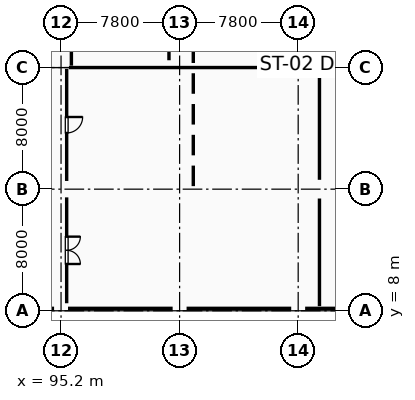
"""IFC4 building model, lengths in metres.
Left out: names, types, materials, properties, quantities, classifications, styles, units other than length and angle.
Written with IfcOpenShell. Run it as: python <this file> out.ifc"""

import sys

from ifc_helpers import new_model, si_unit, direction, frame, frame_2d, origin, origin_2d, place, context, subcontext, project, spatial, rectangle, extrude, element, fill, save


model = new_model("IFC4")
c1 = context("Model", 3, precision=1e-05, world=origin(), true_north=direction((0.0, 1.0)))
c2 = subcontext(c1, "Body", "Model", "MODEL_VIEW")
j1 = project(units=[si_unit("LENGTHUNIT", "METRE"), si_unit("PLANEANGLEUNIT", "RADIAN")], contexts=[c1])
p1 = place(None, origin())
s1 = spatial("IfcSite", under=j1, at=p1, CompositionType="ELEMENT")
p2 = place(p1, origin())
s2 = spatial("IfcBuilding", under=s1, at=p2, CompositionType="ELEMENT")
p3 = place(p2, origin())
s3 = spatial("IfcBuildingStorey", under=s2, at=p3, CompositionType="ELEMENT", Elevation=0.0)
for number, where, z_axis, x_axis in (
    (1, (95.2, 8.0, 0.0), (0.0, 0.0, 1.0), (1.0, 0.0, 0.0)),
    (2, (103.0, 8.0, 0.0), (0.0, 0.0, 1.0), (1.0, 0.0, 0.0)),
    (3, (110.8, 8.0, 0.0), (0.0, 0.0, 1.0), (1.0, 0.0, 0.0)),
):
    element("IfcColumn", number, at=place(p3, frame(where, z_axis=z_axis, x_axis=x_axis)), inside=s3, PredefinedType="COLUMN", context=c2, shape_type="SweptSolid", body=[
        extrude(rectangle(XDim=0.9, YDim=0.9, at=origin_2d()), origin(), (0.0, 0.0, 1.0), 5.4),
    ])
for number, where, z_axis, x_axis in (
    (4, (95.2, 16.0, 0.0), (0.0, 0.0, 1.0), (1.0, 0.0, 0.0)),
    (5, (103.0, 16.0, 0.0), (0.0, 0.0, 1.0), (1.0, 0.0, 0.0)),
):
    element("IfcColumn", number, at=place(p3, frame(where, z_axis=z_axis, x_axis=x_axis)), inside=s3, PredefinedType="COLUMN", context=c2, shape_type="SweptSolid", body=[
        extrude(rectangle(XDim=1.05, YDim=1.05, at=origin_2d()), origin(), (0.0, 0.0, 1.0), 5.4),
    ])
p4 = place(p3, frame((112.6, 16.0, 0.0), z_axis=(0.0, 0.0, 1.0), x_axis=(1.0, 0.0, 0.0)))
e6 = element("IfcColumn", 6, at=p4, inside=s3, PredefinedType="COLUMN", context=c2, shape_type="SweptSolid", body=[
    extrude(rectangle(XDim=1.2, YDim=1.2, at=origin_2d()), origin(), (0.0, 0.0, 1.0), 5.4),
])
p5 = place(p3, frame((118.45, 8.16, 0.0), z_axis=(0.0, 0.0, 1.0), x_axis=(-1.0, 0.0, 0.0)))
e7 = element("IfcWall", 7, at=p5, inside=s3, PredefinedType="STANDARD", context=c2, shape_type="SweptSolid", body=[
    extrude(rectangle(XDim=7.192, YDim=0.28, at=frame_2d((3.596, 0.0))), origin(), (0.0, 0.0, 1.0), 5.4),
])
p6 = place(p5, frame((2.896, 0.0, 0.95)))
e8 = element("IfcOpeningElement", 8, at=p6, cuts=e7, PredefinedType="OPENING", context=c2, shape_type="SweptSolid", body=[
    extrude(rectangle(XDim=1.4, YDim=1.8, at=frame_2d((0.7, 0.9))), frame((0.0, 0.15, 0.0), z_axis=(0.0, -1.0, 0.0), x_axis=(1.0, 0.0, 0.0)), (0.0, 0.0, 1.0), 0.3),
])
p7 = place(p3, frame((110.342, 8.16, 0.0), z_axis=(0.0, 0.0, 1.0), x_axis=(-1.0, 0.0, 0.0)))
e9 = element("IfcWall", 9, at=p7, inside=s3, PredefinedType="STANDARD", context=c2, shape_type="SweptSolid", body=[
    extrude(rectangle(XDim=6.884, YDim=0.28, at=frame_2d((3.442, 0.0))), origin(), (0.0, 0.0, 1.0), 4.705),
])
p8 = place(p7, frame((2.742, 0.0, 0.95)))
e10 = element("IfcOpeningElement", 10, at=p8, cuts=e9, PredefinedType="OPENING", context=c2, shape_type="SweptSolid", body=[
    extrude(rectangle(XDim=1.4, YDim=2.1, at=frame_2d((0.7, 1.05))), frame((0.0, 0.15, 0.0), z_axis=(0.0, -1.0, 0.0), x_axis=(1.0, 0.0, 0.0)), (0.0, 0.0, 1.0), 0.3),
])
p9 = place(p3, frame((102.542, 8.16, 0.0), z_axis=(0.0, 0.0, 1.0), x_axis=(-1.0, 0.0, 0.0)))
e11 = element("IfcWall", 11, at=p9, inside=s3, PredefinedType="STANDARD", context=c2, shape_type="SweptSolid", body=[
    extrude(rectangle(XDim=6.884, YDim=0.28, at=frame_2d((3.442, 0.0))), origin(), (0.0, 0.0, 1.0), 4.655),
])
p10 = place(p9, frame((2.642, 0.0, 0.95)))
e12 = element("IfcOpeningElement", 12, at=p10, cuts=e11, PredefinedType="OPENING", context=c2, shape_type="SweptSolid", body=[
    extrude(rectangle(XDim=1.6, YDim=1.2, at=frame_2d((0.8, 0.6))), frame((0.0, 0.15, 0.0), z_axis=(0.0, -1.0, 0.0), x_axis=(1.0, 0.0, 0.0)), (0.0, 0.0, 1.0), 0.3),
])
p11 = place(p3, frame((94.742, 8.16, 0.0), z_axis=(0.0, 0.0, 1.0), x_axis=(-1.0, 0.0, 0.0)))
e13 = element("IfcWall", 13, at=p11, inside=s3, PredefinedType="STANDARD", context=c2, shape_type="SweptSolid", body=[
    extrude(rectangle(XDim=6.884, YDim=0.28, at=frame_2d((3.442, 0.0))), origin(), (0.0, 0.0, 1.0), 4.605),
])
p12 = place(p11, frame((2.642, 0.0, 0.95)))
e14 = element("IfcOpeningElement", 14, at=p12, cuts=e13, PredefinedType="OPENING", context=c2, shape_type="SweptSolid", body=[
    extrude(rectangle(XDim=1.6, YDim=1.5, at=frame_2d((0.8, 0.75))), frame((0.0, 0.15, 0.0), z_axis=(0.0, -1.0, 0.0), x_axis=(1.0, 0.0, 0.0)), (0.0, 0.0, 1.0), 0.3),
])
p13 = place(p3, frame((95.88, 37.905, 0.0), z_axis=(0.0, 0.0, 1.0), x_axis=(0.0, -1.0, 0.0)))
e15 = element("IfcWall", 15, at=p13, inside=s3, PredefinedType="PARTITIONING", context=c2, shape_type="SweptSolid", body=[
    extrude(rectangle(XDim=13.78, YDim=0.15, at=frame_2d((6.89, 0.0))), origin(), (0.0, 0.0, 1.0), 5.4),
])
p14 = place(p13, frame((6.45, 0.0, 0.0)))
e16 = element("IfcOpeningElement", 16, at=p14, cuts=e15, PredefinedType="OPENING", context=c2, shape_type="SweptSolid", body=[
    extrude(rectangle(XDim=0.88, YDim=2.1, at=frame_2d((0.44, 1.05))), frame((0.0, 0.085, 0.0), z_axis=(0.0, -1.0, 0.0), x_axis=(1.0, 0.0, 0.0)), (0.0, 0.0, 1.0), 0.17),
])
p15 = place(p3, frame((95.57, 23.905, 0.0), z_axis=(0.0, 0.0, 1.0), x_axis=(0.0, -1.0, 0.0)))
e17 = element("IfcWall", 17, at=p15, inside=s3, PredefinedType="PARTITIONING", context=c2, shape_type="SweptSolid", body=[
    extrude(rectangle(XDim=7.365, YDim=0.15, at=frame_2d((3.683, 0.0))), origin(), (0.0, 0.0, 1.0), 4.3),
])
p16 = place(p15, frame((3.158, 0.0, 0.0)))
e18 = element("IfcOpeningElement", 18, at=p16, cuts=e17, PredefinedType="OPENING", context=c2, shape_type="SweptSolid", body=[
    extrude(rectangle(XDim=1.05, YDim=2.15, at=frame_2d((0.525, 1.075))), frame((0.0, 0.085, 0.0), z_axis=(0.0, -1.0, 0.0), x_axis=(1.0, 0.0, 0.0)), (0.0, 0.0, 1.0), 0.17),
])
p17 = place(p3, frame((95.57, 15.46, 0.0), z_axis=(0.0, 0.0, 1.0), x_axis=(0.0, -1.0, 0.0)))
e19 = element("IfcWall", 19, at=p17, inside=s3, PredefinedType="PARTITIONING", context=c2, shape_type="SweptSolid", body=[
    extrude(rectangle(XDim=6.965, YDim=0.15, at=frame_2d((3.482, 0.0))), origin(), (0.0, 0.0, 1.0), 4.3),
])
p18 = place(p17, frame((2.583, 0.0, 0.0)))
e20 = element("IfcOpeningElement", 20, at=p18, cuts=e19, PredefinedType="OPENING", context=c2, shape_type="SweptSolid", body=[
    extrude(rectangle(XDim=1.8, YDim=2.15, at=frame_2d((0.9, 1.075))), frame((0.0, 0.085, 0.0), z_axis=(0.0, -1.0, 0.0), x_axis=(1.0, 0.0, 0.0)), (0.0, 0.0, 1.0), 0.17),
])
p19 = place(p3, frame((95.72, 24.0, 0.0), z_axis=(0.0, 0.0, 1.0), x_axis=(1.0, 0.0, 0.0)))
e21 = element("IfcWall", 21, at=p19, inside=s3, PredefinedType="PARTITIONING", context=c2, shape_type="SweptSolid", body=[
    extrude(rectangle(XDim=16.36, YDim=0.2, at=frame_2d((8.18, 0.0))), origin(), (0.0, 0.0, 1.0), 4.3),
])
p20 = place(p3, frame((112.2, 23.88, 0.0), z_axis=(0.0, 0.0, 1.0), x_axis=(0.0, -1.0, 0.0)))
e22 = element("IfcWall", 22, at=p20, inside=s3, PredefinedType="PARTITIONING", context=c2, shape_type="SweptSolid", body=[
    extrude(rectangle(XDim=7.265, YDim=0.2, at=frame_2d((3.632, 0.0))), origin(), (0.0, 0.0, 1.0), 4.3),
])
p21 = place(p3, frame((112.2, 15.385, 0.0), z_axis=(0.0, 0.0, 1.0), x_axis=(0.0, -1.0, 0.0)))
e23 = element("IfcWall", 23, at=p21, inside=s3, PredefinedType="PARTITIONING", context=c2, shape_type="SweptSolid", body=[
    extrude(rectangle(XDim=7.081, YDim=0.2, at=frame_2d((3.541, 0.0))), origin(), (0.0, 0.0, 1.0), 4.3),
])
p22 = place(p3, frame((102.3, 31.92, 0.0), z_axis=(0.0, 0.0, 1.0), x_axis=(0.0, -1.0, 0.0)))
e24 = element("IfcWall", 24, at=p22, inside=s3, PredefinedType="PARTITIONING", context=c2, shape_type="SweptSolid", body=[
    extrude(rectangle(XDim=7.44, YDim=0.12, at=frame_2d((3.72, 0.0))), origin(), (0.0, 0.0, 1.0), 5.4),
])
p23 = place(p8, origin())
e25 = element("IfcWindow", 25, at=p23, inside=s3, PartitioningType="SINGLE_PANEL", PredefinedType="WINDOW", context=c2, shape_type="SweptSolid", body=[
    extrude(rectangle(XDim=1.4, YDim=2.1, at=frame_2d((0.7, 1.05))), frame((0.0, 0.03, 0.0), z_axis=(0.0, -1.0, 0.0), x_axis=(1.0, 0.0, 0.0)), (0.0, 0.0, 1.0), 0.06),
])
fill(e10, e25)
p24 = place(p10, origin())
e26 = element("IfcWindow", 26, at=p24, inside=s3, PartitioningType="SINGLE_PANEL", PredefinedType="WINDOW", context=c2, shape_type="SweptSolid", body=[
    extrude(rectangle(XDim=1.6, YDim=1.2, at=frame_2d((0.8, 0.6))), frame((0.0, 0.03, 0.0), z_axis=(0.0, -1.0, 0.0), x_axis=(1.0, 0.0, 0.0)), (0.0, 0.0, 1.0), 0.06),
])
fill(e12, e26)
p25 = place(p16, origin())
e27 = element("IfcDoor", 27, at=p25, inside=s3, OperationType="SINGLE_SWING_LEFT", PredefinedType="DOOR", context=c2, shape_type="SweptSolid", body=[
    extrude(rectangle(XDim=1.05, YDim=2.15, at=frame_2d((0.525, 1.075))), frame((0.0, 0.025, 0.0), z_axis=(0.0, -1.0, 0.0), x_axis=(1.0, 0.0, 0.0)), (0.0, 0.0, 1.0), 0.05),
])
fill(e18, e27)
p26 = place(p18, origin())
e28 = element("IfcDoor", 28, at=p26, inside=s3, OperationType="DOUBLE_DOOR_SINGLE_SWING", PredefinedType="DOOR", context=c2, shape_type="SweptSolid", body=[
    extrude(rectangle(XDim=1.8, YDim=2.15, at=frame_2d((0.9, 1.075))), frame((0.0, 0.025, 0.0), z_axis=(0.0, -1.0, 0.0), x_axis=(1.0, 0.0, 0.0)), (0.0, 0.0, 1.0), 0.05),
])
fill(e20, e28)
save(model, sys.argv[1])
